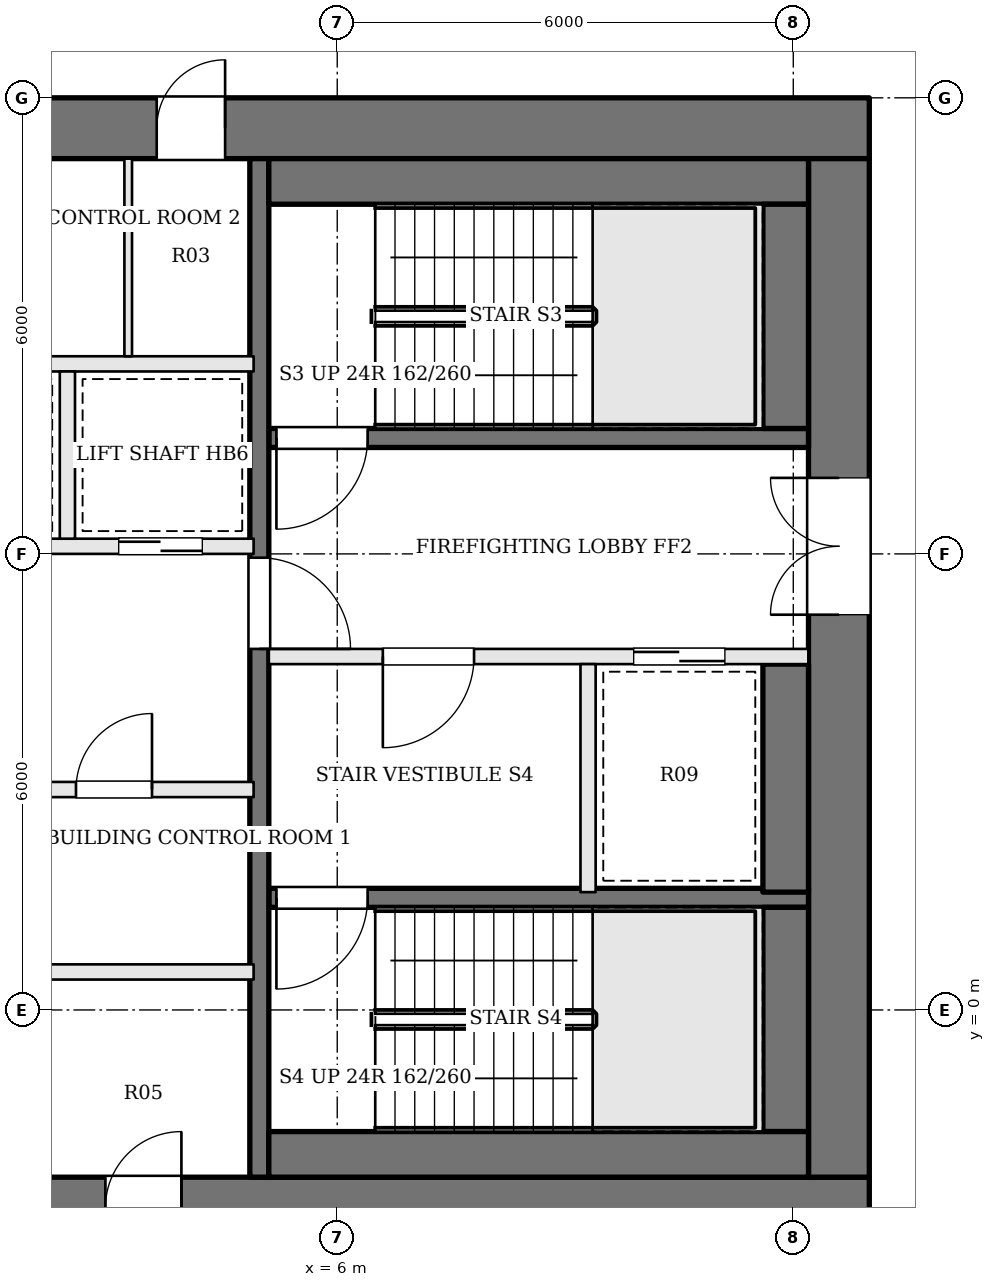
"""IFC4 building model, lengths in metres.
Left out: names, types, materials, properties, quantities, classifications, styles, units other than length and angle.
Written with IfcOpenShell. Run it as: python <this file> out.ifc"""

import sys

from ifc_helpers import new_model, si_unit, direction, frame, frame_2d, origin, place, context, subcontext, project, spatial, rectangle, extrude, element, fill, save


model = new_model("IFC4")
c1 = context("Model", 3, precision=1e-05, world=origin(), true_north=direction((0.0, 1.0)))
c2 = subcontext(c1, "Body", "Model", "MODEL_VIEW")
j1 = project(units=[si_unit("LENGTHUNIT", "METRE"), si_unit("PLANEANGLEUNIT", "RADIAN")], contexts=[c1])
p1 = place(None, origin())
s1 = spatial("IfcSite", under=j1, at=p1, CompositionType="ELEMENT")
p2 = place(p1, origin())
s2 = spatial("IfcBuilding", under=s1, at=p2, CompositionType="ELEMENT")
p3 = place(p2, frame((0.0, 0.0, 205.2)))
s3 = spatial("IfcBuildingStorey", under=s2, at=p3, CompositionType="ELEMENT", Elevation=205.2)
p4 = place(p3, frame((-13.0, 11.6, 0.0), z_axis=(0.0, 0.0, 1.0), x_axis=(1.0, 0.0, 0.0)))
e1 = element("IfcWall", 1, at=p4, inside=s3, PredefinedType="SHEAR", context=c2, shape_type="SweptSolid", body=[
    extrude(rectangle(XDim=26.0, YDim=0.8, at=frame_2d((13.0, 0.0))), origin(), (0.0, 0.0, 1.0), 3.9),
])
p5 = place(p4, frame((9.225, 0.0, 0.0)))
e2 = element("IfcOpeningElement", 2, at=p5, cuts=e1, PredefinedType="OPENING", context=c2, shape_type="SweptSolid", body=[
    extrude(rectangle(XDim=1.0, YDim=2.1, at=frame_2d((0.5, 1.05))), frame((0.0, 0.41, 0.0), z_axis=(0.0, -1.0, 0.0), x_axis=(1.0, 0.0, 0.0)), (0.0, 0.0, 1.0), 0.82),
])
p6 = place(p4, frame((11.825, 0.0, 0.0)))
e3 = element("IfcOpeningElement", 3, at=p6, cuts=e1, PredefinedType="OPENING", context=c2, shape_type="SweptSolid", body=[
    extrude(rectangle(XDim=0.7, YDim=2.1, at=frame_2d((0.35, 1.05))), frame((0.0, 0.41, 0.0), z_axis=(0.0, -1.0, 0.0), x_axis=(1.0, 0.0, 0.0)), (0.0, 0.0, 1.0), 0.82),
])
p7 = place(p4, frame((14.125, 0.0, 0.0)))
e4 = element("IfcOpeningElement", 4, at=p7, cuts=e1, PredefinedType="OPENING", context=c2, shape_type="SweptSolid", body=[
    extrude(rectangle(XDim=1.0, YDim=2.1, at=frame_2d((0.5, 1.05))), frame((0.0, 0.41, 0.0), z_axis=(0.0, -1.0, 0.0), x_axis=(1.0, 0.0, 0.0)), (0.0, 0.0, 1.0), 0.82),
])
p8 = place(p4, frame((16.625, 0.0, 0.0)))
e5 = element("IfcOpeningElement", 5, at=p8, cuts=e1, PredefinedType="OPENING", context=c2, shape_type="SweptSolid", body=[
    extrude(rectangle(XDim=0.9, YDim=2.1, at=frame_2d((0.45, 1.05))), frame((0.0, 0.41, 0.0), z_axis=(0.0, -1.0, 0.0), x_axis=(1.0, 0.0, 0.0)), (0.0, 0.0, 1.0), 0.82),
])
p9 = place(p3, frame((-13.0, -2.6, 0.0), z_axis=(0.0, 0.0, 1.0), x_axis=(1.0, 0.0, 0.0)))
e6 = element("IfcWall", 6, at=p9, inside=s3, PredefinedType="SHEAR", context=c2, shape_type="SweptSolid", body=[
    extrude(rectangle(XDim=26.0, YDim=0.8, at=frame_2d((13.0, 0.0))), origin(), (0.0, 0.0, 1.0), 3.9),
])
p10 = place(p9, frame((8.925, 0.0, 0.0)))
e7 = element("IfcOpeningElement", 7, at=p10, cuts=e6, PredefinedType="OPENING", context=c2, shape_type="SweptSolid", body=[
    extrude(rectangle(XDim=0.9, YDim=2.1, at=frame_2d((0.45, 1.05))), frame((0.0, 0.41, 0.0), z_axis=(0.0, -1.0, 0.0), x_axis=(1.0, 0.0, 0.0)), (0.0, 0.0, 1.0), 0.82),
])
p11 = place(p9, frame((11.475, 0.0, 0.0)))
e8 = element("IfcOpeningElement", 8, at=p11, cuts=e6, PredefinedType="OPENING", context=c2, shape_type="SweptSolid", body=[
    extrude(rectangle(XDim=0.9, YDim=2.1, at=frame_2d((0.45, 1.05))), frame((0.0, 0.41, 0.0), z_axis=(0.0, -1.0, 0.0), x_axis=(1.0, 0.0, 0.0)), (0.0, 0.0, 1.0), 0.82),
])
p12 = place(p9, frame((13.6, 0.0, 0.0)))
e9 = element("IfcOpeningElement", 9, at=p12, cuts=e6, PredefinedType="OPENING", context=c2, shape_type="SweptSolid", body=[
    extrude(rectangle(XDim=1.0, YDim=2.1, at=frame_2d((0.5, 1.05))), frame((0.0, 0.41, 0.0), z_axis=(0.0, -1.0, 0.0), x_axis=(1.0, 0.0, 0.0)), (0.0, 0.0, 1.0), 0.82),
])
p13 = place(p9, frame((15.95, 0.0, 0.0)))
e10 = element("IfcOpeningElement", 10, at=p13, cuts=e6, PredefinedType="OPENING", context=c2, shape_type="SweptSolid", body=[
    extrude(rectangle(XDim=1.0, YDim=2.1, at=frame_2d((0.5, 1.05))), frame((0.0, 0.41, 0.0), z_axis=(0.0, -1.0, 0.0), x_axis=(1.0, 0.0, 0.0)), (0.0, 0.0, 1.0), 0.82),
])
p14 = place(p3, frame((12.6, -2.2, 0.0), z_axis=(0.0, 0.0, 1.0), x_axis=(0.0, 1.0, 0.0)))
e11 = element("IfcWall", 11, at=p14, inside=s3, PredefinedType="SHEAR", context=c2, shape_type="SweptSolid", body=[
    extrude(rectangle(XDim=13.4, YDim=0.8, at=frame_2d((6.7, 0.0))), origin(), (0.0, 0.0, 1.0), 3.9),
])
p15 = place(p14, frame((7.4, 0.0, 0.0)))
e12 = element("IfcOpeningElement", 12, at=p15, cuts=e11, PredefinedType="OPENING", context=c2, shape_type="SweptSolid", body=[
    extrude(rectangle(XDim=1.8, YDim=2.1, at=frame_2d((0.9, 1.05))), frame((0.0, 0.41, 0.0), z_axis=(0.0, -1.0, 0.0), x_axis=(1.0, 0.0, 0.0)), (0.0, 0.0, 1.0), 0.82),
])
p16 = place(p3, frame((12.2, 7.525, 0.0), z_axis=(0.0, 0.0, 1.0), x_axis=(-1.0, 0.0, 0.0)))
e13 = element("IfcWall", 13, at=p16, inside=s3, PredefinedType="SOLIDWALL", context=c2, shape_type="SweptSolid", body=[
    extrude(rectangle(XDim=7.1, YDim=0.25, at=frame_2d((3.55, 0.0))), origin(), (0.0, 0.0, 1.0), 3.7),
])
p17 = place(p16, frame((5.8, 0.0, 0.0)))
e14 = element("IfcOpeningElement", 14, at=p17, cuts=e13, PredefinedType="OPENING", context=c2, shape_type="SweptSolid", body=[
    extrude(rectangle(XDim=1.2, YDim=2.1, at=frame_2d((0.6, 1.05))), frame((0.0, 0.135, 0.0), z_axis=(0.0, -1.0, 0.0), x_axis=(1.0, 0.0, 0.0)), (0.0, 0.0, 1.0), 0.27),
])
p18 = place(p3, frame((12.2, 4.65, 0.0), z_axis=(0.0, 0.0, 1.0), x_axis=(-1.0, 0.0, 0.0)))
e15 = element("IfcWall", 15, at=p18, inside=s3, PredefinedType="SOLIDWALL", context=c2, shape_type="SweptSolid", body=[
    extrude(rectangle(XDim=7.1, YDim=0.2, at=frame_2d((3.55, 0.0))), origin(), (0.0, 0.0, 1.0), 3.7),
])
p19 = place(p18, frame((4.4, 0.0, 0.0)))
e16 = element("IfcOpeningElement", 16, at=p19, cuts=e15, PredefinedType="OPENING", context=c2, shape_type="SweptSolid", body=[
    extrude(rectangle(XDim=1.2, YDim=2.1, at=frame_2d((0.6, 1.05))), frame((0.0, 0.11, 0.0), z_axis=(0.0, -1.0, 0.0), x_axis=(1.0, 0.0, 0.0)), (0.0, 0.0, 1.0), 0.22),
])
p20 = place(p18, frame((1.1, 0.0, 0.0)))
e17 = element("IfcOpeningElement", 17, at=p20, cuts=e15, PredefinedType="OPENING", context=c2, shape_type="SweptSolid", body=[
    extrude(rectangle(XDim=1.2, YDim=2.1, at=frame_2d((0.6, 1.05))), frame((0.0, 0.11, 0.0), z_axis=(0.0, -1.0, 0.0), x_axis=(1.0, 0.0, 0.0)), (0.0, 0.0, 1.0), 0.22),
])
p21 = place(p3, frame((12.2, 1.475, 0.0), z_axis=(0.0, 0.0, 1.0), x_axis=(-1.0, 0.0, 0.0)))
e18 = element("IfcWall", 18, at=p21, inside=s3, PredefinedType="SOLIDWALL", context=c2, shape_type="SweptSolid", body=[
    extrude(rectangle(XDim=7.1, YDim=0.25, at=frame_2d((3.55, 0.0))), origin(), (0.0, 0.0, 1.0), 3.7),
])
p22 = place(p21, frame((5.8, 0.0, 0.0)))
e19 = element("IfcOpeningElement", 19, at=p22, cuts=e18, PredefinedType="OPENING", context=c2, shape_type="SweptSolid", body=[
    extrude(rectangle(XDim=1.2, YDim=2.1, at=frame_2d((0.6, 1.05))), frame((0.0, 0.135, 0.0), z_axis=(0.0, -1.0, 0.0), x_axis=(1.0, 0.0, 0.0)), (0.0, 0.0, 1.0), 0.27),
])
p23 = place(p3, frame((9.3, 4.55, 0.0), z_axis=(0.0, 0.0, 1.0), x_axis=(0.0, -1.0, 0.0)))
e20 = element("IfcWall", 20, at=p23, inside=s3, PredefinedType="SOLIDWALL", context=c2, shape_type="SweptSolid", body=[
    extrude(rectangle(XDim=3.0, YDim=0.2, at=frame_2d((1.5, 0.0))), origin(), (0.0, 0.0, 1.0), 3.7),
])
p24 = place(p3, frame((4.975, 11.2, 0.0), z_axis=(0.0, 0.0, 1.0), x_axis=(0.0, -1.0, 0.0)))
e21 = element("IfcWall", 21, at=p24, inside=s3, PredefinedType="SOLIDWALL", context=c2, shape_type="SweptSolid", body=[
    extrude(rectangle(XDim=13.4, YDim=0.25, at=frame_2d((6.7, 0.0))), origin(), (0.0, 0.0, 1.0), 3.7),
])
p25 = place(p24, frame((5.25, 0.0, 0.0)))
e22 = element("IfcOpeningElement", 22, at=p25, cuts=e21, PredefinedType="OPENING", context=c2, shape_type="SweptSolid", body=[
    extrude(rectangle(XDim=1.2, YDim=2.1, at=frame_2d((0.6, 1.05))), frame((0.0, 0.135, 0.0), z_axis=(0.0, -1.0, 0.0), x_axis=(1.0, 0.0, 0.0)), (0.0, 0.0, 1.0), 0.27),
])
p26 = place(p3, frame((12.2, 10.9, 0.0), z_axis=(0.0, 0.0, 1.0), x_axis=(-1.0, 0.0, 0.0)))
e23 = element("IfcWall", 23, at=p26, inside=s3, PredefinedType="SOLIDWALL", context=c2, shape_type="SweptSolid", body=[
    extrude(rectangle(XDim=7.1, YDim=0.6, at=frame_2d((3.55, 0.0))), origin(), (0.0, 0.0, 1.0), 3.7),
])
p27 = place(p3, frame((11.9, 10.6, 0.0), z_axis=(0.0, 0.0, 1.0), x_axis=(0.0, -1.0, 0.0)))
e24 = element("IfcWall", 24, at=p27, inside=s3, PredefinedType="SOLIDWALL", context=c2, shape_type="SweptSolid", body=[
    extrude(rectangle(XDim=2.95, YDim=0.6, at=frame_2d((1.475, 0.0))), origin(), (0.0, 0.0, 1.0), 3.7),
])
p28 = place(p3, frame((11.9, 4.55, 0.0), z_axis=(0.0, 0.0, 1.0), x_axis=(0.0, -1.0, 0.0)))
e25 = element("IfcWall", 25, at=p28, inside=s3, PredefinedType="SOLIDWALL", context=c2, shape_type="SweptSolid", body=[
    extrude(rectangle(XDim=3.0, YDim=0.6, at=frame_2d((1.5, 0.0))), origin(), (0.0, 0.0, 1.0), 3.7),
])
p29 = place(p3, frame((11.9, 1.35, 0.0), z_axis=(0.0, 0.0, 1.0), x_axis=(0.0, -1.0, 0.0)))
e26 = element("IfcWall", 26, at=p29, inside=s3, PredefinedType="SOLIDWALL", context=c2, shape_type="SweptSolid", body=[
    extrude(rectangle(XDim=2.95, YDim=0.6, at=frame_2d((1.475, 0.0))), origin(), (0.0, 0.0, 1.0), 3.7),
])
p30 = place(p3, frame((12.2, -1.9, 0.0), z_axis=(0.0, 0.0, 1.0), x_axis=(-1.0, 0.0, 0.0)))
e27 = element("IfcWall", 27, at=p30, inside=s3, PredefinedType="SOLIDWALL", context=c2, shape_type="SweptSolid", body=[
    extrude(rectangle(XDim=7.1, YDim=0.6, at=frame_2d((3.55, 0.0))), origin(), (0.0, 0.0, 1.0), 3.7),
])
p31 = place(p3, frame((-4.9, 0.5, 0.0), z_axis=(0.0, 0.0, 1.0), x_axis=(1.0, 0.0, 0.0)))
e28 = element("IfcWall", 28, at=p31, inside=s3, PredefinedType="SOLIDWALL", context=c2, shape_type="SweptSolid", body=[
    extrude(rectangle(XDim=9.8, YDim=0.2, at=frame_2d((4.9, 0.0))), origin(), (0.0, 0.0, 1.0), 3.7),
])
p32 = place(p3, frame((-4.9, 2.9, 0.0), z_axis=(0.0, 0.0, 1.0), x_axis=(1.0, 0.0, 0.0)))
e29 = element("IfcWall", 29, at=p32, inside=s3, PredefinedType="SOLIDWALL", context=c2, shape_type="SweptSolid", body=[
    extrude(rectangle(XDim=9.8, YDim=0.2, at=frame_2d((4.9, 0.0))), origin(), (0.0, 0.0, 1.0), 3.7),
])
p33 = place(p32, frame((0.675, 0.0, 0.0)))
e30 = element("IfcOpeningElement", 30, at=p33, cuts=e29, PredefinedType="OPENING", context=c2, shape_type="SweptSolid", body=[
    extrude(rectangle(XDim=1.1, YDim=2.1, at=frame_2d((0.55, 1.05))), frame((0.0, 0.11, 0.0), z_axis=(0.0, -1.0, 0.0), x_axis=(1.0, 0.0, 0.0)), (0.0, 0.0, 1.0), 0.22),
])
p34 = place(p32, frame((2.613, 0.0, 0.0)))
e31 = element("IfcOpeningElement", 31, at=p34, cuts=e29, PredefinedType="OPENING", context=c2, shape_type="SweptSolid", body=[
    extrude(rectangle(XDim=0.9, YDim=2.1, at=frame_2d((0.45, 1.05))), frame((0.0, 0.11, 0.0), z_axis=(0.0, -1.0, 0.0), x_axis=(1.0, 0.0, 0.0)), (0.0, 0.0, 1.0), 0.22),
])
p35 = place(p32, frame((4.35, 0.0, 0.0)))
e32 = element("IfcOpeningElement", 32, at=p35, cuts=e29, PredefinedType="OPENING", context=c2, shape_type="SweptSolid", body=[
    extrude(rectangle(XDim=1.1, YDim=2.1, at=frame_2d((0.55, 1.05))), frame((0.0, 0.11, 0.0), z_axis=(0.0, -1.0, 0.0), x_axis=(1.0, 0.0, 0.0)), (0.0, 0.0, 1.0), 0.22),
])
p36 = place(p32, frame((7.463, 0.0, 0.0)))
e33 = element("IfcOpeningElement", 33, at=p36, cuts=e29, PredefinedType="OPENING", context=c2, shape_type="SweptSolid", body=[
    extrude(rectangle(XDim=1.0, YDim=2.1, at=frame_2d((0.5, 1.05))), frame((0.0, 0.11, 0.0), z_axis=(0.0, -1.0, 0.0), x_axis=(1.0, 0.0, 0.0)), (0.0, 0.0, 1.0), 0.22),
])
p37 = place(p3, frame((-4.9, 6.1, 0.0), z_axis=(0.0, 0.0, 1.0), x_axis=(1.0, 0.0, 0.0)))
e34 = element("IfcWall", 34, at=p37, inside=s3, PredefinedType="SOLIDWALL", context=c2, shape_type="SweptSolid", body=[
    extrude(rectangle(XDim=9.8, YDim=0.2, at=frame_2d((4.9, 0.0))), origin(), (0.0, 0.0, 1.0), 3.7),
])
p38 = place(p37, frame((0.675, 0.0, 0.0)))
e35 = element("IfcOpeningElement", 35, at=p38, cuts=e34, PredefinedType="OPENING", context=c2, shape_type="SweptSolid", body=[
    extrude(rectangle(XDim=1.1, YDim=2.1, at=frame_2d((0.55, 1.05))), frame((0.0, 0.11, 0.0), z_axis=(0.0, -1.0, 0.0), x_axis=(1.0, 0.0, 0.0)), (0.0, 0.0, 1.0), 0.22),
])
p39 = place(p37, frame((3.125, 0.0, 0.0)))
e36 = element("IfcOpeningElement", 36, at=p39, cuts=e34, PredefinedType="OPENING", context=c2, shape_type="SweptSolid", body=[
    extrude(rectangle(XDim=1.1, YDim=2.1, at=frame_2d((0.55, 1.05))), frame((0.0, 0.11, 0.0), z_axis=(0.0, -1.0, 0.0), x_axis=(1.0, 0.0, 0.0)), (0.0, 0.0, 1.0), 0.22),
])
p40 = place(p37, frame((5.575, 0.0, 0.0)))
e37 = element("IfcOpeningElement", 37, at=p40, cuts=e34, PredefinedType="OPENING", context=c2, shape_type="SweptSolid", body=[
    extrude(rectangle(XDim=1.1, YDim=2.1, at=frame_2d((0.55, 1.05))), frame((0.0, 0.11, 0.0), z_axis=(0.0, -1.0, 0.0), x_axis=(1.0, 0.0, 0.0)), (0.0, 0.0, 1.0), 0.22),
])
p41 = place(p37, frame((8.025, 0.0, 0.0)))
e38 = element("IfcOpeningElement", 38, at=p41, cuts=e34, PredefinedType="OPENING", context=c2, shape_type="SweptSolid", body=[
    extrude(rectangle(XDim=1.1, YDim=2.1, at=frame_2d((0.55, 1.05))), frame((0.0, 0.11, 0.0), z_axis=(0.0, -1.0, 0.0), x_axis=(1.0, 0.0, 0.0)), (0.0, 0.0, 1.0), 0.22),
])
p42 = place(p3, frame((-4.9, 8.5, 0.0), z_axis=(0.0, 0.0, 1.0), x_axis=(1.0, 0.0, 0.0)))
e39 = element("IfcWall", 39, at=p42, inside=s3, PredefinedType="SOLIDWALL", context=c2, shape_type="SweptSolid", body=[
    extrude(rectangle(XDim=9.8, YDim=0.2, at=frame_2d((4.9, 0.0))), origin(), (0.0, 0.0, 1.0), 3.7),
])
p43 = place(p3, frame((2.45, 6.2, 0.0), z_axis=(0.0, 0.0, 1.0), x_axis=(0.0, 1.0, 0.0)))
e40 = element("IfcWall", 40, at=p43, inside=s3, PredefinedType="SOLIDWALL", context=c2, shape_type="SweptSolid", body=[
    extrude(rectangle(XDim=2.2, YDim=0.2, at=frame_2d((1.1, 0.0))), origin(), (0.0, 0.0, 1.0), 3.7),
])
p44 = place(p3, frame((3.25, 8.6, 0.0), z_axis=(0.0, 0.0, 1.0), x_axis=(0.0, 1.0, 0.0)))
e41 = element("IfcWall", 41, at=p44, inside=s3, PredefinedType="PARTITIONING", context=c2, shape_type="SweptSolid", body=[
    extrude(rectangle(XDim=2.6, YDim=0.1, at=frame_2d((1.3, 0.0))), origin(), (0.0, 0.0, 1.0), 3.7),
])
p45 = place(p15, origin())
e42 = element("IfcDoor", 42, at=p45, inside=s3, OperationType="DOUBLE_DOOR_SINGLE_SWING", PredefinedType="DOOR", context=c2, shape_type="SweptSolid", body=[
    extrude(rectangle(XDim=1.8, YDim=2.1, at=frame_2d((0.9, 1.05))), frame((0.0, 0.025, 0.0), z_axis=(0.0, -1.0, 0.0), x_axis=(1.0, 0.0, 0.0)), (0.0, 0.0, 1.0), 0.05),
])
fill(e12, e42)
p46 = place(p25, origin())
e43 = element("IfcDoor", 43, at=p46, inside=s3, OperationType="SINGLE_SWING_RIGHT", PredefinedType="DOOR", context=c2, shape_type="SweptSolid", body=[
    extrude(rectangle(XDim=1.2, YDim=2.1, at=frame_2d((0.6, 1.05))), frame((0.0, 0.025, 0.0), z_axis=(0.0, -1.0, 0.0), x_axis=(1.0, 0.0, 0.0)), (0.0, 0.0, 1.0), 0.05),
])
fill(e22, e43)
p47 = place(p19, origin())
e44 = element("IfcDoor", 44, at=p47, inside=s3, OperationType="SINGLE_SWING_RIGHT", PredefinedType="DOOR", context=c2, shape_type="SweptSolid", body=[
    extrude(rectangle(XDim=1.2, YDim=2.1, at=frame_2d((0.6, 1.05))), frame((0.0, 0.025, 0.0), z_axis=(0.0, -1.0, 0.0), x_axis=(1.0, 0.0, 0.0)), (0.0, 0.0, 1.0), 0.05),
])
fill(e16, e44)
p48 = place(p17, origin())
e45 = element("IfcDoor", 45, at=p48, inside=s3, OperationType="SINGLE_SWING_RIGHT", PredefinedType="DOOR", context=c2, shape_type="SweptSolid", body=[
    extrude(rectangle(XDim=1.2, YDim=2.1, at=frame_2d((0.6, 1.05))), frame((0.0, 0.025, 0.0), z_axis=(0.0, -1.0, 0.0), x_axis=(1.0, 0.0, 0.0)), (0.0, 0.0, 1.0), 0.05),
])
fill(e14, e45)
p49 = place(p22, origin())
e46 = element("IfcDoor", 46, at=p49, inside=s3, OperationType="SINGLE_SWING_RIGHT", PredefinedType="DOOR", context=c2, shape_type="SweptSolid", body=[
    extrude(rectangle(XDim=1.2, YDim=2.1, at=frame_2d((0.6, 1.05))), frame((0.0, 0.025, 0.0), z_axis=(0.0, -1.0, 0.0), x_axis=(1.0, 0.0, 0.0)), (0.0, 0.0, 1.0), 0.05),
])
fill(e19, e46)
p50 = place(p20, origin())
e47 = element("IfcDoor", 47, at=p50, inside=s3, OperationType="SLIDING_TO_RIGHT", PredefinedType="DOOR", context=c2, shape_type="SweptSolid", body=[
    extrude(rectangle(XDim=1.2, YDim=2.1, at=frame_2d((0.6, 1.05))), frame((0.0, 0.025, 0.0), z_axis=(0.0, -1.0, 0.0), x_axis=(1.0, 0.0, 0.0)), (0.0, 0.0, 1.0), 0.05),
])
fill(e17, e47)
p51 = place(p36, origin())
e48 = element("IfcDoor", 48, at=p51, inside=s3, OperationType="SINGLE_SWING_RIGHT", PredefinedType="DOOR", context=c2, shape_type="SweptSolid", body=[
    extrude(rectangle(XDim=1.0, YDim=2.1, at=frame_2d((0.5, 1.05))), frame((0.0, 0.025, 0.0), z_axis=(0.0, -1.0, 0.0), x_axis=(1.0, 0.0, 0.0)), (0.0, 0.0, 1.0), 0.05),
])
fill(e33, e48)
p52 = place(p41, origin())
e49 = element("IfcDoor", 49, at=p52, inside=s3, OperationType="SLIDING_TO_LEFT", PredefinedType="DOOR", context=c2, shape_type="SweptSolid", body=[
    extrude(rectangle(XDim=1.1, YDim=2.1, at=frame_2d((0.55, 1.05))), frame((0.0, 0.025, 0.0), z_axis=(0.0, -1.0, 0.0), x_axis=(1.0, 0.0, 0.0)), (0.0, 0.0, 1.0), 0.05),
])
fill(e38, e49)
p53 = place(p13, origin())
e50 = element("IfcDoor", 50, at=p53, inside=s3, OperationType="SINGLE_SWING_RIGHT", PredefinedType="DOOR", context=c2, shape_type="SweptSolid", body=[
    extrude(rectangle(XDim=1.0, YDim=2.1, at=frame_2d((0.5, 1.05))), frame((0.0, 0.025, 0.0), z_axis=(0.0, -1.0, 0.0), x_axis=(1.0, 0.0, 0.0)), (0.0, 0.0, 1.0), 0.05),
])
fill(e10, e50)
p54 = place(p8, origin())
e51 = element("IfcDoor", 51, at=p54, inside=s3, OperationType="SINGLE_SWING_RIGHT", PredefinedType="DOOR", context=c2, shape_type="SweptSolid", body=[
    extrude(rectangle(XDim=0.9, YDim=2.1, at=frame_2d((0.45, 1.05))), frame((0.0, 0.025, 0.0), z_axis=(0.0, -1.0, 0.0), x_axis=(1.0, 0.0, 0.0)), (0.0, 0.0, 1.0), 0.05),
])
fill(e5, e51)
save(model, sys.argv[1])
